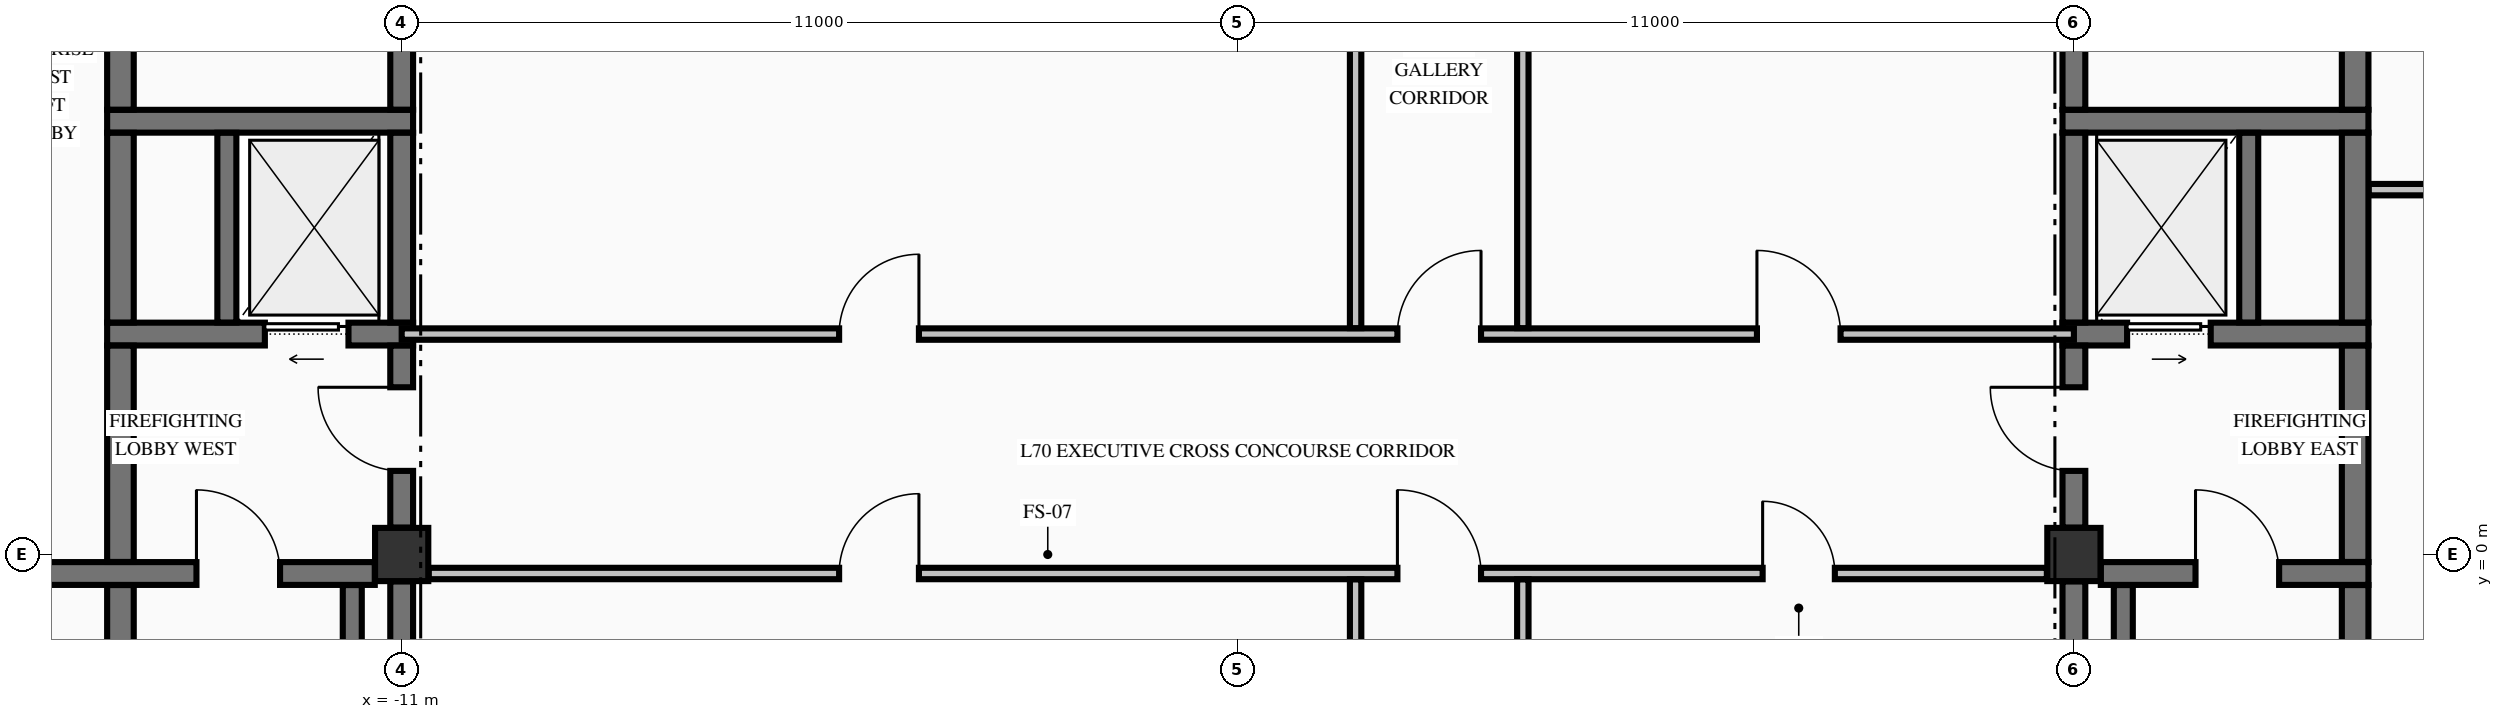
"""IFC4 building model, lengths in metres.
Left out: names, types, materials, properties, quantities, classifications, styles, units other than length and angle.
Written with IfcOpenShell. Run it as: python <this file> out.ifc"""

import sys

from ifc_helpers import new_model, si_unit, direction, frame, frame_2d, origin, origin_2d, place, context, subcontext, project, spatial, rectangle, extrude, element, fill, save


model = new_model("IFC4")
c1 = context("Model", 3, precision=1e-05, world=origin(), true_north=direction((0.0, 1.0)))
c2 = subcontext(c1, "Body", "Model", "MODEL_VIEW")
j1 = project(units=[si_unit("LENGTHUNIT", "METRE"), si_unit("PLANEANGLEUNIT", "RADIAN")], contexts=[c1])
p1 = place(None, origin())
s1 = spatial("IfcSite", under=j1, at=p1, CompositionType="ELEMENT")
p2 = place(p1, origin())
s2 = spatial("IfcBuilding", under=s1, at=p2, CompositionType="ELEMENT")
p3 = place(p2, frame((0.0, 0.0, 264.12)))
s3 = spatial("IfcBuildingStorey", under=s2, at=p3, CompositionType="ELEMENT", Elevation=264.12)
for number, where, z_axis, x_axis in (
    (1, (-11.0, 0.0, -0.25), (0.0, 0.0, 1.0), (1.0, 0.0, 0.0)),
    (2, (11.0, 0.0, -0.25), (0.0, 0.0, 1.0), (1.0, 0.0, 0.0)),
):
    element("IfcColumn", number, at=place(p3, frame(where, z_axis=z_axis, x_axis=x_axis)), inside=s3, PredefinedType="COLUMN", context=c2, shape_type="SweptSolid", body=[
        extrude(rectangle(XDim=0.7, YDim=0.7, at=origin_2d()), origin(), (0.0, 0.0, 1.0), 3.23),
    ])
p4 = place(p3, frame((-19.646, -0.25, 0.0), z_axis=(0.0, 0.0, 1.0), x_axis=(1.0, 0.0, 0.0)))
e3 = element("IfcWall", 3, at=p4, inside=s3, PredefinedType="SHEAR", context=c2, shape_type="SweptSolid", body=[
    extrude(rectangle(XDim=8.292, YDim=0.3, at=frame_2d((4.146, 0.0))), origin(), (0.0, 0.0, 1.0), 2.98),
])
p5 = place(p4, frame((5.946, 0.0, 0.0)))
e4 = element("IfcOpeningElement", 4, at=p5, cuts=e3, PredefinedType="OPENING", context=c2, shape_type="SweptSolid", body=[
    extrude(rectangle(XDim=1.1, YDim=2.15, at=frame_2d((0.55, 1.075))), frame((0.0, 0.16, 0.0), z_axis=(0.0, -1.0, 0.0), x_axis=(1.0, 0.0, 0.0)), (0.0, 0.0, 1.0), 0.32),
])
p6 = place(p3, frame((11.354, -0.25, 0.0), z_axis=(0.0, 0.0, 1.0), x_axis=(1.0, 0.0, 0.0)))
e5 = element("IfcWall", 5, at=p6, inside=s3, PredefinedType="SHEAR", context=c2, shape_type="SweptSolid", body=[
    extrude(rectangle(XDim=3.521, YDim=0.3, at=frame_2d((1.76, 0.0))), origin(), (0.0, 0.0, 1.0), 2.98),
])
p7 = place(p6, frame((1.246, 0.0, 0.0)))
e6 = element("IfcOpeningElement", 6, at=p7, cuts=e5, PredefinedType="OPENING", context=c2, shape_type="SweptSolid", body=[
    extrude(rectangle(XDim=1.1, YDim=2.15, at=frame_2d((0.55, 1.075))), frame((0.0, 0.16, 0.0), z_axis=(0.0, -1.0, 0.0), x_axis=(1.0, 0.0, 0.0)), (0.0, 0.0, 1.0), 0.32),
])
p8 = place(p3, frame((-14.875, 2.9, 0.0), z_axis=(0.0, 0.0, 1.0), x_axis=(1.0, 0.0, 0.0)))
e7 = element("IfcWall", 7, at=p8, inside=s3, PredefinedType="SHEAR", context=c2, shape_type="SweptSolid", body=[
    extrude(rectangle(XDim=4.025, YDim=0.3, at=frame_2d((2.012, 0.0))), origin(), (0.0, 0.0, 1.0), 2.98),
])
p9 = place(p8, frame((2.075, 0.0, 0.0)))
e8 = element("IfcOpeningElement", 8, at=p9, cuts=e7, PredefinedType="OPENING", context=c2, shape_type="SweptSolid", body=[
    extrude(rectangle(XDim=1.1, YDim=2.2, at=frame_2d((0.55, 1.1))), frame((0.0, 0.16, 0.0), z_axis=(0.0, -1.0, 0.0), x_axis=(1.0, 0.0, 0.0)), (0.0, 0.0, 1.0), 0.32),
])
p10 = place(p3, frame((10.85, 2.9, 0.0), z_axis=(0.0, 0.0, 1.0), x_axis=(1.0, 0.0, 0.0)))
e9 = element("IfcWall", 9, at=p10, inside=s3, PredefinedType="SHEAR", context=c2, shape_type="SweptSolid", body=[
    extrude(rectangle(XDim=4.025, YDim=0.3, at=frame_2d((2.012, 0.0))), origin(), (0.0, 0.0, 1.0), 2.98),
])
p11 = place(p10, frame((0.85, 0.0, 0.0)))
e10 = element("IfcOpeningElement", 10, at=p11, cuts=e9, PredefinedType="OPENING", context=c2, shape_type="SweptSolid", body=[
    extrude(rectangle(XDim=1.1, YDim=2.2, at=frame_2d((0.55, 1.1))), frame((0.0, 0.16, 0.0), z_axis=(0.0, -1.0, 0.0), x_axis=(1.0, 0.0, 0.0)), (0.0, 0.0, 1.0), 0.32),
])
for number, where, z_axis, x_axis in (
    (11, (-14.875, 5.7, 0.0), (0.0, 0.0, 1.0), (1.0, 0.0, 0.0)),
    (12, (10.85, 5.7, 0.0), (0.0, 0.0, 1.0), (1.0, 0.0, 0.0)),
):
    element("IfcWall", number, at=place(p3, frame(where, z_axis=z_axis, x_axis=x_axis)), inside=s3, PredefinedType="SHEAR", context=c2, shape_type="SweptSolid", body=[
        extrude(rectangle(XDim=4.025, YDim=0.3, at=frame_2d((2.012, 0.0))), origin(), (0.0, 0.0, 1.0), 2.98),
    ])
p12 = place(p3, frame((-10.644, -0.25, 0.0), z_axis=(0.0, 0.0, 1.0), x_axis=(1.0, 0.0, 0.0)))
e13 = element("IfcWall", 13, at=p12, inside=s3, PredefinedType="PARTITIONING", context=c2, shape_type="SweptSolid", body=[
    extrude(rectangle(XDim=21.288, YDim=0.15, at=frame_2d((10.644, 0.0))), origin(), (0.0, 0.0, 1.0), 2.98),
])
p13 = place(p12, frame((12.744, 0.0, 0.0)))
e14 = element("IfcOpeningElement", 14, at=p13, cuts=e13, PredefinedType="OPENING", context=c2, shape_type="SweptSolid", body=[
    extrude(rectangle(XDim=1.1, YDim=2.15, at=frame_2d((0.55, 1.075))), frame((0.0, 0.085, 0.0), z_axis=(0.0, -1.0, 0.0), x_axis=(1.0, 0.0, 0.0)), (0.0, 0.0, 1.0), 0.17),
])
p14 = place(p12, frame((5.399, 0.0, 0.0)))
e15 = element("IfcOpeningElement", 15, at=p14, cuts=e13, PredefinedType="OPENING", context=c2, shape_type="SweptSolid", body=[
    extrude(rectangle(XDim=1.05, YDim=2.15, at=frame_2d((0.525, 1.075))), frame((0.0, 0.085, 0.0), z_axis=(0.0, -1.0, 0.0), x_axis=(1.0, 0.0, 0.0)), (0.0, 0.0, 1.0), 0.17),
])
p15 = place(p12, frame((17.549, 0.0, 0.0)))
e16 = element("IfcOpeningElement", 16, at=p15, cuts=e13, PredefinedType="OPENING", context=c2, shape_type="SweptSolid", body=[
    extrude(rectangle(XDim=0.95, YDim=2.15, at=frame_2d((0.475, 1.075))), frame((0.0, 0.085, 0.0), z_axis=(0.0, -1.0, 0.0), x_axis=(1.0, 0.0, 0.0)), (0.0, 0.0, 1.0), 0.17),
])
p16 = place(p3, frame((-11.0, 2.9, 0.0), z_axis=(0.0, 0.0, 1.0), x_axis=(1.0, 0.0, 0.0)))
e17 = element("IfcWall", 17, at=p16, inside=s3, PredefinedType="PARTITIONING", context=c2, shape_type="SweptSolid", body=[
    extrude(rectangle(XDim=22.0, YDim=0.15, at=frame_2d((11.0, 0.0))), origin(), (0.0, 0.0, 1.0), 2.98),
])
p17 = place(p16, frame((13.1, 0.0, 0.0)))
e18 = element("IfcOpeningElement", 18, at=p17, cuts=e17, PredefinedType="OPENING", context=c2, shape_type="SweptSolid", body=[
    extrude(rectangle(XDim=1.1, YDim=2.15, at=frame_2d((0.55, 1.075))), frame((0.0, 0.085, 0.0), z_axis=(0.0, -1.0, 0.0), x_axis=(1.0, 0.0, 0.0)), (0.0, 0.0, 1.0), 0.17),
])
p18 = place(p16, frame((5.755, 0.0, 0.0)))
e19 = element("IfcOpeningElement", 19, at=p18, cuts=e17, PredefinedType="OPENING", context=c2, shape_type="SweptSolid", body=[
    extrude(rectangle(XDim=1.05, YDim=2.15, at=frame_2d((0.525, 1.075))), frame((0.0, 0.085, 0.0), z_axis=(0.0, -1.0, 0.0), x_axis=(1.0, 0.0, 0.0)), (0.0, 0.0, 1.0), 0.17),
])
p19 = place(p16, frame((17.83, 0.0, 0.0)))
e20 = element("IfcOpeningElement", 20, at=p19, cuts=e17, PredefinedType="OPENING", context=c2, shape_type="SweptSolid", body=[
    extrude(rectangle(XDim=1.1, YDim=2.15, at=frame_2d((0.55, 1.075))), frame((0.0, 0.085, 0.0), z_axis=(0.0, -1.0, 0.0), x_axis=(1.0, 0.0, 0.0)), (0.0, 0.0, 1.0), 0.17),
])
p20 = place(p3, frame((14.878, 4.8, 0.0), z_axis=(0.0, 0.0, 1.0), x_axis=(1.0, 0.0, 0.0)))
e21 = element("IfcWall", 21, at=p20, inside=s3, PredefinedType="PARTITIONING", context=c2, shape_type="SweptSolid", body=[
    extrude(rectangle(XDim=4.944, YDim=0.15, at=frame_2d((2.472, 0.0))), origin(), (0.0, 0.0, 1.0), 2.98),
])
p21 = place(p3, frame((-14.7, -9.773, 0.0), z_axis=(0.0, 0.0, 1.0), x_axis=(0.0, 1.0, 0.0)))
e22 = element("IfcWall", 22, at=p21, inside=s3, PredefinedType="SHEAR", context=c2, shape_type="SweptSolid", body=[
    extrude(rectangle(XDim=9.371, YDim=0.35, at=frame_2d((4.686, 0.0))), origin(), (0.0, 0.0, 1.0), 2.98),
])
p22 = place(p3, frame((-14.7, -0.098, 0.0), z_axis=(0.0, 0.0, 1.0), x_axis=(0.0, 1.0, 0.0)))
e23 = element("IfcWall", 23, at=p22, inside=s3, PredefinedType="SHEAR", context=c2, shape_type="SweptSolid", body=[
    extrude(rectangle(XDim=2.846, YDim=0.35, at=frame_2d((1.423, 0.0))), origin(), (0.0, 0.0, 1.0), 2.98),
])
p23 = place(p3, frame((-14.7, 3.052, 0.0), z_axis=(0.0, 0.0, 1.0), x_axis=(0.0, 1.0, 0.0)))
e24 = element("IfcWall", 24, at=p23, inside=s3, PredefinedType="SHEAR", context=c2, shape_type="SweptSolid", body=[
    extrude(rectangle(XDim=2.496, YDim=0.35, at=frame_2d((1.248, 0.0))), origin(), (0.0, 0.0, 1.0), 2.98),
])
p24 = place(p3, frame((-14.7, 5.852, 0.0), z_axis=(0.0, 0.0, 1.0), x_axis=(0.0, 1.0, 0.0)))
e25 = element("IfcWall", 25, at=p24, inside=s3, PredefinedType="SHEAR", context=c2, shape_type="SweptSolid", body=[
    extrude(rectangle(XDim=4.471, YDim=0.35, at=frame_2d((2.235, 0.0))), origin(), (0.0, 0.0, 1.0), 2.98),
])
p25 = place(p3, frame((-13.3, 3.052, 0.0), z_axis=(0.0, 0.0, 1.0), x_axis=(0.0, 1.0, 0.0)))
e26 = element("IfcWall", 26, at=p25, inside=s3, PredefinedType="SOLIDWALL", context=c2, shape_type="SweptSolid", body=[
    extrude(rectangle(XDim=2.496, YDim=0.25, at=frame_2d((1.248, 0.0))), origin(), (0.0, 0.0, 1.0), 2.98),
])
p26 = place(p3, frame((-11.65, -9.798, 0.0), z_axis=(0.0, 0.0, 1.0), x_axis=(0.0, 1.0, 0.0)))
e27 = element("IfcWall", 27, at=p26, inside=s3, PredefinedType="SOLIDWALL", context=c2, shape_type="SweptSolid", body=[
    extrude(rectangle(XDim=9.396, YDim=0.25, at=frame_2d((4.698, 0.0))), origin(), (0.0, 0.0, 1.0), 2.98),
])
p27 = place(p3, frame((-11.0, -9.596, 0.0), z_axis=(0.0, 0.0, 1.0), x_axis=(0.0, 1.0, 0.0)))
e28 = element("IfcWall", 28, at=p27, inside=s3, PredefinedType="SHEAR", context=c2, shape_type="SweptSolid", body=[
    extrude(rectangle(XDim=9.242, YDim=0.3, at=frame_2d((4.621, 0.0))), origin(), (0.0, 0.0, 1.0), 2.98),
])
p28 = place(p3, frame((-11.0, 0.354, 0.0), z_axis=(0.0, 0.0, 1.0), x_axis=(0.0, 1.0, 0.0)))
e29 = element("IfcWall", 29, at=p28, inside=s3, PredefinedType="SHEAR", context=c2, shape_type="SweptSolid", body=[
    extrude(rectangle(XDim=2.394, YDim=0.3, at=frame_2d((1.197, 0.0))), origin(), (0.0, 0.0, 1.0), 2.98),
])
p29 = place(p28, frame((0.746, 0.0, 0.0)))
e30 = element("IfcOpeningElement", 30, at=p29, cuts=e29, PredefinedType="OPENING", context=c2, shape_type="SweptSolid", body=[
    extrude(rectangle(XDim=1.1, YDim=2.15, at=frame_2d((0.55, 1.075))), frame((0.0, 0.16, 0.0), z_axis=(0.0, -1.0, 0.0), x_axis=(1.0, 0.0, 0.0)), (0.0, 0.0, 1.0), 0.32),
])
p30 = place(p3, frame((-11.0, 3.052, 0.0), z_axis=(0.0, 0.0, 1.0), x_axis=(0.0, 1.0, 0.0)))
e31 = element("IfcWall", 31, at=p30, inside=s3, PredefinedType="SHEAR", context=c2, shape_type="SweptSolid", body=[
    extrude(rectangle(XDim=2.496, YDim=0.3, at=frame_2d((1.248, 0.0))), origin(), (0.0, 0.0, 1.0), 2.98),
])
p31 = place(p3, frame((-11.0, 5.852, 0.0), z_axis=(0.0, 0.0, 1.0), x_axis=(0.0, 1.0, 0.0)))
e32 = element("IfcWall", 32, at=p31, inside=s3, PredefinedType="SHEAR", context=c2, shape_type="SweptSolid", body=[
    extrude(rectangle(XDim=4.294, YDim=0.3, at=frame_2d((2.147, 0.0))), origin(), (0.0, 0.0, 1.0), 2.98),
])
p32 = place(p3, frame((11.0, -9.596, 0.0), z_axis=(0.0, 0.0, 1.0), x_axis=(0.0, 1.0, 0.0)))
e33 = element("IfcWall", 33, at=p32, inside=s3, PredefinedType="SHEAR", context=c2, shape_type="SweptSolid", body=[
    extrude(rectangle(XDim=9.242, YDim=0.3, at=frame_2d((4.621, 0.0))), origin(), (0.0, 0.0, 1.0), 2.98),
])
p33 = place(p3, frame((11.0, 0.354, 0.0), z_axis=(0.0, 0.0, 1.0), x_axis=(0.0, 1.0, 0.0)))
e34 = element("IfcWall", 34, at=p33, inside=s3, PredefinedType="SHEAR", context=c2, shape_type="SweptSolid", body=[
    extrude(rectangle(XDim=2.394, YDim=0.3, at=frame_2d((1.197, 0.0))), origin(), (0.0, 0.0, 1.0), 2.98),
])
p34 = place(p33, frame((0.746, 0.0, 0.0)))
e35 = element("IfcOpeningElement", 35, at=p34, cuts=e34, PredefinedType="OPENING", context=c2, shape_type="SweptSolid", body=[
    extrude(rectangle(XDim=1.1, YDim=2.15, at=frame_2d((0.55, 1.075))), frame((0.0, 0.16, 0.0), z_axis=(0.0, -1.0, 0.0), x_axis=(1.0, 0.0, 0.0)), (0.0, 0.0, 1.0), 0.32),
])
p35 = place(p3, frame((11.0, 3.052, 0.0), z_axis=(0.0, 0.0, 1.0), x_axis=(0.0, 1.0, 0.0)))
e36 = element("IfcWall", 36, at=p35, inside=s3, PredefinedType="SHEAR", context=c2, shape_type="SweptSolid", body=[
    extrude(rectangle(XDim=2.496, YDim=0.3, at=frame_2d((1.248, 0.0))), origin(), (0.0, 0.0, 1.0), 2.98),
])
p36 = place(p3, frame((11.0, 5.852, 0.0), z_axis=(0.0, 0.0, 1.0), x_axis=(0.0, 1.0, 0.0)))
e37 = element("IfcWall", 37, at=p36, inside=s3, PredefinedType="SHEAR", context=c2, shape_type="SweptSolid", body=[
    extrude(rectangle(XDim=4.294, YDim=0.3, at=frame_2d((2.147, 0.0))), origin(), (0.0, 0.0, 1.0), 2.98),
])
p37 = place(p3, frame((11.65, -9.798, 0.0), z_axis=(0.0, 0.0, 1.0), x_axis=(0.0, 1.0, 0.0)))
e38 = element("IfcWall", 38, at=p37, inside=s3, PredefinedType="SOLIDWALL", context=c2, shape_type="SweptSolid", body=[
    extrude(rectangle(XDim=9.396, YDim=0.25, at=frame_2d((4.698, 0.0))), origin(), (0.0, 0.0, 1.0), 2.98),
])
p38 = place(p3, frame((13.3, 3.052, 0.0), z_axis=(0.0, 0.0, 1.0), x_axis=(0.0, 1.0, 0.0)))
e39 = element("IfcWall", 39, at=p38, inside=s3, PredefinedType="SOLIDWALL", context=c2, shape_type="SweptSolid", body=[
    extrude(rectangle(XDim=2.496, YDim=0.25, at=frame_2d((1.248, 0.0))), origin(), (0.0, 0.0, 1.0), 2.98),
])
p39 = place(p3, frame((14.7, -9.773, 0.0), z_axis=(0.0, 0.0, 1.0), x_axis=(0.0, 1.0, 0.0)))
e40 = element("IfcWall", 40, at=p39, inside=s3, PredefinedType="SHEAR", context=c2, shape_type="SweptSolid", body=[
    extrude(rectangle(XDim=9.371, YDim=0.35, at=frame_2d((4.686, 0.0))), origin(), (0.0, 0.0, 1.0), 2.98),
])
p40 = place(p3, frame((14.7, -0.098, 0.0), z_axis=(0.0, 0.0, 1.0), x_axis=(0.0, 1.0, 0.0)))
e41 = element("IfcWall", 41, at=p40, inside=s3, PredefinedType="SHEAR", context=c2, shape_type="SweptSolid", body=[
    extrude(rectangle(XDim=2.846, YDim=0.35, at=frame_2d((1.423, 0.0))), origin(), (0.0, 0.0, 1.0), 2.98),
])
p41 = place(p3, frame((14.7, 3.052, 0.0), z_axis=(0.0, 0.0, 1.0), x_axis=(0.0, 1.0, 0.0)))
e42 = element("IfcWall", 42, at=p41, inside=s3, PredefinedType="SHEAR", context=c2, shape_type="SweptSolid", body=[
    extrude(rectangle(XDim=2.496, YDim=0.35, at=frame_2d((1.248, 0.0))), origin(), (0.0, 0.0, 1.0), 2.98),
])
p42 = place(p3, frame((14.7, 5.852, 0.0), z_axis=(0.0, 0.0, 1.0), x_axis=(0.0, 1.0, 0.0)))
e43 = element("IfcWall", 43, at=p42, inside=s3, PredefinedType="SHEAR", context=c2, shape_type="SweptSolid", body=[
    extrude(rectangle(XDim=4.471, YDim=0.35, at=frame_2d((2.235, 0.0))), origin(), (0.0, 0.0, 1.0), 2.98),
])
p43 = place(p3, frame((1.55, -9.872, 0.0), z_axis=(0.0, 0.0, 1.0), x_axis=(0.0, 1.0, 0.0)))
e44 = element("IfcWall", 44, at=p43, inside=s3, PredefinedType="PARTITIONING", context=c2, shape_type="SweptSolid", body=[
    extrude(rectangle(XDim=9.544, YDim=0.15, at=frame_2d((4.772, 0.0))), origin(), (0.0, 0.0, 1.0), 2.98),
])
p44 = place(p3, frame((1.55, 2.978, 0.0), z_axis=(0.0, 0.0, 1.0), x_axis=(0.0, 1.0, 0.0)))
e45 = element("IfcWall", 45, at=p44, inside=s3, PredefinedType="PARTITIONING", context=c2, shape_type="SweptSolid", body=[
    extrude(rectangle(XDim=7.444, YDim=0.15, at=frame_2d((3.722, 0.0))), origin(), (0.0, 0.0, 1.0), 2.98),
])
p45 = place(p3, frame((3.75, -4.147, 0.0), z_axis=(0.0, 0.0, 1.0), x_axis=(0.0, 1.0, 0.0)))
e46 = element("IfcWall", 46, at=p45, inside=s3, PredefinedType="PARTITIONING", context=c2, shape_type="SweptSolid", body=[
    extrude(rectangle(XDim=3.819, YDim=0.15, at=frame_2d((1.91, 0.0))), origin(), (0.0, 0.0, 1.0), 2.98),
])
p46 = place(p3, frame((3.75, 2.978, 0.0), z_axis=(0.0, 0.0, 1.0), x_axis=(0.0, 1.0, 0.0)))
e47 = element("IfcWall", 47, at=p46, inside=s3, PredefinedType="PARTITIONING", context=c2, shape_type="SweptSolid", body=[
    extrude(rectangle(XDim=7.444, YDim=0.15, at=frame_2d((3.722, 0.0))), origin(), (0.0, 0.0, 1.0), 2.98),
])
p47 = place(p5, origin())
e48 = element("IfcDoor", 48, at=p47, inside=s3, OperationType="SINGLE_SWING_LEFT", PredefinedType="DOOR", context=c2, shape_type="SweptSolid", body=[
    extrude(rectangle(XDim=1.1, YDim=2.15, at=frame_2d((0.55, 1.075))), frame((0.0, 0.025, 0.0), z_axis=(0.0, -1.0, 0.0), x_axis=(1.0, 0.0, 0.0)), (0.0, 0.0, 1.0), 0.05),
])
fill(e4, e48)
p48 = place(p29, origin())
e49 = element("IfcDoor", 49, at=p48, inside=s3, OperationType="SINGLE_SWING_RIGHT", PredefinedType="DOOR", context=c2, shape_type="SweptSolid", body=[
    extrude(rectangle(XDim=1.1, YDim=2.15, at=frame_2d((0.55, 1.075))), frame((0.0, 0.025, 0.0), z_axis=(0.0, -1.0, 0.0), x_axis=(1.0, 0.0, 0.0)), (0.0, 0.0, 1.0), 0.05),
])
fill(e30, e49)
p49 = place(p9, origin())
e50 = element("IfcDoor", 50, at=p49, inside=s3, OperationType="SLIDING_TO_LEFT", PredefinedType="DOOR", context=c2, shape_type="SweptSolid", body=[
    extrude(rectangle(XDim=1.1, YDim=2.2, at=frame_2d((0.55, 1.1))), frame((0.0, 0.025, 0.0), z_axis=(0.0, -1.0, 0.0), x_axis=(1.0, 0.0, 0.0)), (0.0, 0.0, 1.0), 0.05),
])
fill(e8, e50)
p50 = place(p7, origin())
e51 = element("IfcDoor", 51, at=p50, inside=s3, OperationType="SINGLE_SWING_LEFT", PredefinedType="DOOR", context=c2, shape_type="SweptSolid", body=[
    extrude(rectangle(XDim=1.1, YDim=2.15, at=frame_2d((0.55, 1.075))), frame((0.0, 0.025, 0.0), z_axis=(0.0, -1.0, 0.0), x_axis=(1.0, 0.0, 0.0)), (0.0, 0.0, 1.0), 0.05),
])
fill(e6, e51)
p51 = place(p34, origin())
e52 = element("IfcDoor", 52, at=p51, inside=s3, OperationType="SINGLE_SWING_RIGHT", PredefinedType="DOOR", context=c2, shape_type="SweptSolid", body=[
    extrude(rectangle(XDim=1.1, YDim=2.15, at=frame_2d((0.55, 1.075))), frame((0.0, 0.025, 0.0), z_axis=(0.0, -1.0, 0.0), x_axis=(1.0, 0.0, 0.0)), (0.0, 0.0, 1.0), 0.05),
])
fill(e35, e52)
p52 = place(p11, origin())
e53 = element("IfcDoor", 53, at=p52, inside=s3, OperationType="SLIDING_TO_RIGHT", PredefinedType="DOOR", context=c2, shape_type="SweptSolid", body=[
    extrude(rectangle(XDim=1.1, YDim=2.2, at=frame_2d((0.55, 1.1))), frame((0.0, 0.025, 0.0), z_axis=(0.0, -1.0, 0.0), x_axis=(1.0, 0.0, 0.0)), (0.0, 0.0, 1.0), 0.05),
])
fill(e10, e53)
p53 = place(p17, origin())
e54 = element("IfcDoor", 54, at=p53, inside=s3, OperationType="SINGLE_SWING_RIGHT", PredefinedType="DOOR", context=c2, shape_type="SweptSolid", body=[
    extrude(rectangle(XDim=1.1, YDim=2.15, at=frame_2d((0.55, 1.075))), frame((0.0, 0.025, 0.0), z_axis=(0.0, -1.0, 0.0), x_axis=(1.0, 0.0, 0.0)), (0.0, 0.0, 1.0), 0.05),
])
fill(e18, e54)
p54 = place(p13, origin())
e55 = element("IfcDoor", 55, at=p54, inside=s3, OperationType="SINGLE_SWING_LEFT", PredefinedType="DOOR", context=c2, shape_type="SweptSolid", body=[
    extrude(rectangle(XDim=1.1, YDim=2.15, at=frame_2d((0.55, 1.075))), frame((0.0, 0.025, 0.0), z_axis=(0.0, -1.0, 0.0), x_axis=(1.0, 0.0, 0.0)), (0.0, 0.0, 1.0), 0.05),
])
fill(e14, e55)
p55 = place(p18, origin())
e56 = element("IfcDoor", 56, at=p55, inside=s3, OperationType="SINGLE_SWING_RIGHT", PredefinedType="DOOR", context=c2, shape_type="SweptSolid", body=[
    extrude(rectangle(XDim=1.05, YDim=2.15, at=frame_2d((0.525, 1.075))), frame((0.0, 0.025, 0.0), z_axis=(0.0, -1.0, 0.0), x_axis=(1.0, 0.0, 0.0)), (0.0, 0.0, 1.0), 0.05),
])
fill(e19, e56)
p56 = place(p19, origin())
e57 = element("IfcDoor", 57, at=p56, inside=s3, OperationType="SINGLE_SWING_LEFT", PredefinedType="DOOR", context=c2, shape_type="SweptSolid", body=[
    extrude(rectangle(XDim=1.1, YDim=2.15, at=frame_2d((0.55, 1.075))), frame((0.0, 0.025, 0.0), z_axis=(0.0, -1.0, 0.0), x_axis=(1.0, 0.0, 0.0)), (0.0, 0.0, 1.0), 0.05),
])
fill(e20, e57)
p57 = place(p14, origin())
e58 = element("IfcDoor", 58, at=p57, inside=s3, OperationType="SINGLE_SWING_RIGHT", PredefinedType="DOOR", context=c2, shape_type="SweptSolid", body=[
    extrude(rectangle(XDim=1.05, YDim=2.15, at=frame_2d((0.525, 1.075))), frame((0.0, 0.025, 0.0), z_axis=(0.0, -1.0, 0.0), x_axis=(1.0, 0.0, 0.0)), (0.0, 0.0, 1.0), 0.05),
])
fill(e15, e58)
p58 = place(p15, origin())
e59 = element("IfcDoor", 59, at=p58, inside=s3, OperationType="SINGLE_SWING_LEFT", PredefinedType="DOOR", context=c2, shape_type="SweptSolid", body=[
    extrude(rectangle(XDim=0.95, YDim=2.15, at=frame_2d((0.475, 1.075))), frame((0.0, 0.025, 0.0), z_axis=(0.0, -1.0, 0.0), x_axis=(1.0, 0.0, 0.0)), (0.0, 0.0, 1.0), 0.05),
])
fill(e16, e59)
save(model, sys.argv[1])
